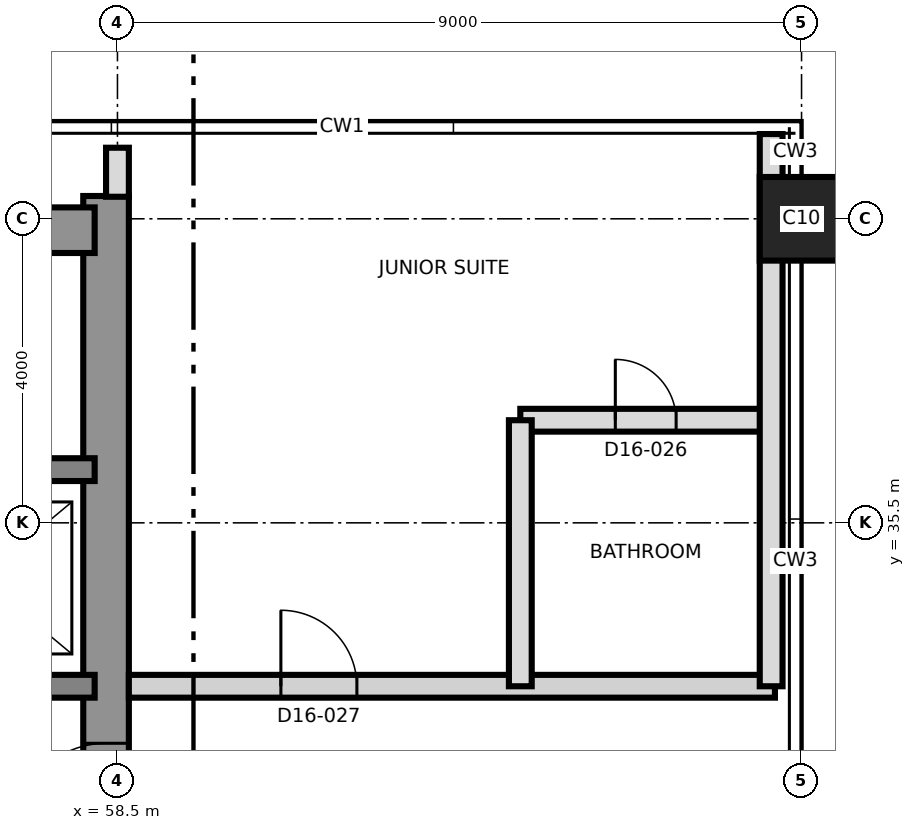
"""IFC4 building model, lengths in metres.
Left out: names, types, materials, properties, quantities, classifications, styles, units other than length and angle.
Written with IfcOpenShell. Run it as: python <this file> out.ifc"""

import sys

from ifc_helpers import new_model, si_unit, direction, frame, frame_2d, origin, origin_2d, place, context, subcontext, project, spatial, rectangle, extrude, element, fill, save


model = new_model("IFC4")
c1 = context("Model", 3, precision=1e-05, world=origin(), true_north=direction((0.0, 1.0)))
c2 = subcontext(c1, "Body", "Model", "MODEL_VIEW")
j1 = project(units=[si_unit("LENGTHUNIT", "METRE"), si_unit("PLANEANGLEUNIT", "RADIAN")], contexts=[c1])
p1 = place(None, origin())
s1 = spatial("IfcSite", under=j1, at=p1, CompositionType="ELEMENT")
p2 = place(p1, origin())
s2 = spatial("IfcBuilding", under=s1, at=p2, CompositionType="ELEMENT")
p3 = place(p2, frame((0.0, 0.0, 168.1)))
s3 = spatial("IfcBuildingStorey", under=s2, at=p3, CompositionType="ELEMENT", Elevation=168.1)
p4 = place(p3, frame((58.35, 21.2, 0.0), z_axis=(0.0, 0.0, 1.0), x_axis=(0.0, 1.0, 0.0)))
e1 = element("IfcWall", 1, at=p4, inside=s3, PredefinedType="SHEAR", context=c2, shape_type="SweptSolid", body=[
    extrude(rectangle(XDim=18.6, YDim=0.6, at=frame_2d((9.3, 0.0))), origin(), (0.0, 0.0, 1.0), 3.7),
])
p5 = place(p4, frame((10.2, 0.0, 0.0)))
e2 = element("IfcOpeningElement", 2, at=p5, cuts=e1, PredefinedType="OPENING", context=c2, shape_type="SweptSolid", body=[
    extrude(rectangle(XDim=1.2, YDim=2.1, at=frame_2d((0.6, 1.05))), frame((0.0, 0.31, 0.0), z_axis=(0.0, -1.0, 0.0), x_axis=(1.0, 0.0, 0.0)), (0.0, 0.0, 1.0), 0.62),
])
p6 = place(p3, frame((31.2, 39.35, 0.0), z_axis=(0.0, 0.0, 1.0), x_axis=(1.0, 0.0, 0.0)))
e3 = element("IfcWall", 3, at=p6, inside=s3, PredefinedType="SHEAR", context=c2, shape_type="SweptSolid", body=[
    extrude(rectangle(XDim=27.0, YDim=0.6, at=frame_2d((13.5, 0.0))), origin(), (0.0, 0.0, 1.0), 3.7),
])
p7 = place(p6, frame((10.5, 0.0, 0.0)))
e4 = element("IfcOpeningElement", 4, at=p7, cuts=e3, PredefinedType="OPENING", context=c2, shape_type="SweptSolid", body=[
    extrude(rectangle(XDim=1.2, YDim=2.1, at=frame_2d((0.6, 1.05))), frame((0.0, 0.31, 0.0), z_axis=(0.0, -1.0, 0.0), x_axis=(1.0, 0.0, 0.0)), (0.0, 0.0, 1.0), 0.62),
])
p8 = place(p3, frame((31.8, 33.35, 0.0), z_axis=(0.0, 0.0, 1.0), x_axis=(1.0, 0.0, 0.0)))
e5 = element("IfcWall", 5, at=p8, inside=s3, PredefinedType="SHEAR", context=c2, shape_type="SweptSolid", body=[
    extrude(rectangle(XDim=26.4, YDim=0.3, at=frame_2d((13.2, 0.0))), origin(), (0.0, 0.0, 1.0), 3.7),
])
p9 = place(p8, frame((13.85, 0.0, 0.0)))
e6 = element("IfcOpeningElement", 6, at=p9, cuts=e5, PredefinedType="OPENING", context=c2, shape_type="SweptSolid", body=[
    extrude(rectangle(XDim=1.4, YDim=2.1, at=frame_2d((0.7, 1.05))), frame((0.0, 0.16, 0.0), z_axis=(0.0, -1.0, 0.0), x_axis=(1.0, 0.0, 0.0)), (0.0, 0.0, 1.0), 0.32),
])
p10 = place(p8, frame((5.325, 0.0, 0.0)))
e7 = element("IfcOpeningElement", 7, at=p10, cuts=e5, PredefinedType="OPENING", context=c2, shape_type="SweptSolid", body=[
    extrude(rectangle(XDim=1.2, YDim=2.1, at=frame_2d((0.6, 1.05))), frame((0.0, 0.16, 0.0), z_axis=(0.0, -1.0, 0.0), x_axis=(1.0, 0.0, 0.0)), (0.0, 0.0, 1.0), 0.32),
])
p11 = place(p8, frame((19.875, 0.0, 0.0)))
e8 = element("IfcOpeningElement", 8, at=p11, cuts=e5, PredefinedType="OPENING", context=c2, shape_type="SweptSolid", body=[
    extrude(rectangle(XDim=1.2, YDim=2.1, at=frame_2d((0.6, 1.05))), frame((0.0, 0.16, 0.0), z_axis=(0.0, -1.0, 0.0), x_axis=(1.0, 0.0, 0.0)), (0.0, 0.0, 1.0), 0.32),
])
p12 = place(p3, frame((43.5, 36.2, 0.0), z_axis=(0.0, 0.0, 1.0), x_axis=(1.0, 0.0, 0.0)))
e9 = element("IfcWall", 9, at=p12, inside=s3, PredefinedType="SHEAR", context=c2, shape_type="SweptSolid", body=[
    extrude(rectangle(XDim=14.7, YDim=0.3, at=frame_2d((7.35, 0.0))), origin(), (0.0, 0.0, 1.0), 3.7),
])
p13 = place(p12, frame((6.9, 0.0, 0.0)))
e10 = element("IfcOpeningElement", 10, at=p13, cuts=e9, PredefinedType="OPENING", context=c2, shape_type="SweptSolid", body=[
    extrude(rectangle(XDim=1.2, YDim=2.1, at=frame_2d((0.6, 1.05))), frame((0.0, 0.16, 0.0), z_axis=(0.0, -1.0, 0.0), x_axis=(1.0, 0.0, 0.0)), (0.0, 0.0, 1.0), 0.32),
])
p14 = place(p12, frame((0.7, 0.0, 0.0)))
e11 = element("IfcOpeningElement", 11, at=p14, cuts=e9, PredefinedType="OPENING", context=c2, shape_type="SweptSolid", body=[
    extrude(rectangle(XDim=1.3, YDim=2.4, at=frame_2d((0.65, 1.2))), frame((0.0, 0.16, 0.0), z_axis=(0.0, -1.0, 0.0), x_axis=(1.0, 0.0, 0.0)), (0.0, 0.0, 1.0), 0.32),
])
p15 = place(p12, frame((3.7, 0.0, 0.0)))
e12 = element("IfcOpeningElement", 12, at=p15, cuts=e9, PredefinedType="OPENING", context=c2, shape_type="SweptSolid", body=[
    extrude(rectangle(XDim=1.3, YDim=2.4, at=frame_2d((0.65, 1.2))), frame((0.0, 0.16, 0.0), z_axis=(0.0, -1.0, 0.0), x_axis=(1.0, 0.0, 0.0)), (0.0, 0.0, 1.0), 0.32),
])
p16 = place(p3, frame((67.5, 39.5, 0.0), z_axis=(0.0, 0.0, 1.0), x_axis=(1.0, 0.0, 0.0)))
e13 = element("IfcColumn", 13, at=p16, inside=s3, PredefinedType="COLUMN", context=c2, shape_type="SweptSolid", body=[
    extrude(rectangle(XDim=1.1, YDim=1.1, at=origin_2d()), origin(), (0.0, 0.0, 1.0), 3.7),
])
p17 = place(p3, frame((58.65, 33.35, 0.0), z_axis=(0.0, 0.0, 1.0), x_axis=(1.0, 0.0, 0.0)))
e14 = element("IfcWall", 14, at=p17, inside=s3, PredefinedType="PARTITIONING", context=c2, shape_type="SweptSolid", body=[
    extrude(rectangle(XDim=8.5, YDim=0.3, at=frame_2d((4.25, 0.0))), origin(), (0.0, 0.0, 1.0), 3.4),
])
p18 = place(p17, frame((2.0, 0.0, 0.0)))
e15 = element("IfcOpeningElement", 15, at=p18, cuts=e14, PredefinedType="OPENING", context=c2, shape_type="SweptSolid", body=[
    extrude(rectangle(XDim=1.0, YDim=2.4, at=frame_2d((0.5, 1.2))), frame((0.0, 0.16, 0.0), z_axis=(0.0, -1.0, 0.0), x_axis=(1.0, 0.0, 0.0)), (0.0, 0.0, 1.0), 0.32),
])
p19 = place(p3, frame((63.8, 36.85, 0.0), z_axis=(0.0, 0.0, 1.0), x_axis=(1.0, 0.0, 0.0)))
e16 = element("IfcWall", 16, at=p19, inside=s3, PredefinedType="PARTITIONING", context=c2, shape_type="SweptSolid", body=[
    extrude(rectangle(XDim=3.3, YDim=0.3, at=frame_2d((1.65, 0.0))), origin(), (0.0, 0.0, 1.0), 3.4),
])
p20 = place(p19, frame((1.25, 0.0, 0.0)))
e17 = element("IfcOpeningElement", 17, at=p20, cuts=e16, PredefinedType="OPENING", context=c2, shape_type="SweptSolid", body=[
    extrude(rectangle(XDim=0.8, YDim=2.1, at=frame_2d((0.4, 1.05))), frame((0.0, 0.16, 0.0), z_axis=(0.0, -1.0, 0.0), x_axis=(1.0, 0.0, 0.0)), (0.0, 0.0, 1.0), 0.32),
])
p21 = place(p3, frame((58.5, 39.79, 0.0), z_axis=(0.0, 0.0, 1.0), x_axis=(0.0, 1.0, 0.0)))
e18 = element("IfcWall", 18, at=p21, inside=s3, PredefinedType="PARTITIONING", context=c2, shape_type="SweptSolid", body=[
    extrude(rectangle(XDim=0.645, YDim=0.3, at=frame_2d((0.323, 0.0))), origin(), (0.0, 0.0, 1.0), 3.4),
])
p22 = place(p3, frame((63.8, 33.35, 0.0), z_axis=(0.0, 0.0, 1.0), x_axis=(0.0, 1.0, 0.0)))
e19 = element("IfcWall", 19, at=p22, inside=s3, PredefinedType="PARTITIONING", context=c2, shape_type="SweptSolid", body=[
    extrude(rectangle(XDim=3.5, YDim=0.3, at=frame_2d((1.75, 0.0))), origin(), (0.0, 0.0, 1.0), 3.4),
])
p23 = place(p3, frame((67.1, 33.35, 0.0), z_axis=(0.0, 0.0, 1.0), x_axis=(0.0, 1.0, 0.0)))
e20 = element("IfcWall", 20, at=p23, inside=s3, PredefinedType="PARTITIONING", context=c2, shape_type="SweptSolid", body=[
    extrude(rectangle(XDim=7.265, YDim=0.3, at=frame_2d((3.632, 0.0))), origin(), (0.0, 0.0, 1.0), 3.4),
])
p24 = place(p5, origin())
e21 = element("IfcDoor", 21, at=p24, inside=s3, OperationType="SINGLE_SWING_LEFT", PredefinedType="DOOR", context=c2, shape_type="SweptSolid", body=[
    extrude(rectangle(XDim=1.2, YDim=2.1, at=frame_2d((0.6, 1.05))), frame((0.0, 0.025, 0.0), z_axis=(0.0, -1.0, 0.0), x_axis=(1.0, 0.0, 0.0)), (0.0, 0.0, 1.0), 0.05),
])
fill(e2, e21)
p25 = place(p20, origin())
e22 = element("IfcDoor", 22, at=p25, inside=s3, OperationType="SINGLE_SWING_LEFT", PredefinedType="DOOR", context=c2, shape_type="SweptSolid", body=[
    extrude(rectangle(XDim=0.8, YDim=2.1, at=frame_2d((0.4, 1.05))), frame((0.0, 0.025, 0.0), z_axis=(0.0, -1.0, 0.0), x_axis=(1.0, 0.0, 0.0)), (0.0, 0.0, 1.0), 0.05),
])
fill(e17, e22)
p26 = place(p18, origin())
e23 = element("IfcDoor", 23, at=p26, inside=s3, OperationType="SINGLE_SWING_LEFT", PredefinedType="DOOR", context=c2, shape_type="SweptSolid", body=[
    extrude(rectangle(XDim=1.0, YDim=2.4, at=frame_2d((0.5, 1.2))), frame((0.0, 0.025, 0.0), z_axis=(0.0, -1.0, 0.0), x_axis=(1.0, 0.0, 0.0)), (0.0, 0.0, 1.0), 0.05),
])
fill(e15, e23)
save(model, sys.argv[1])
